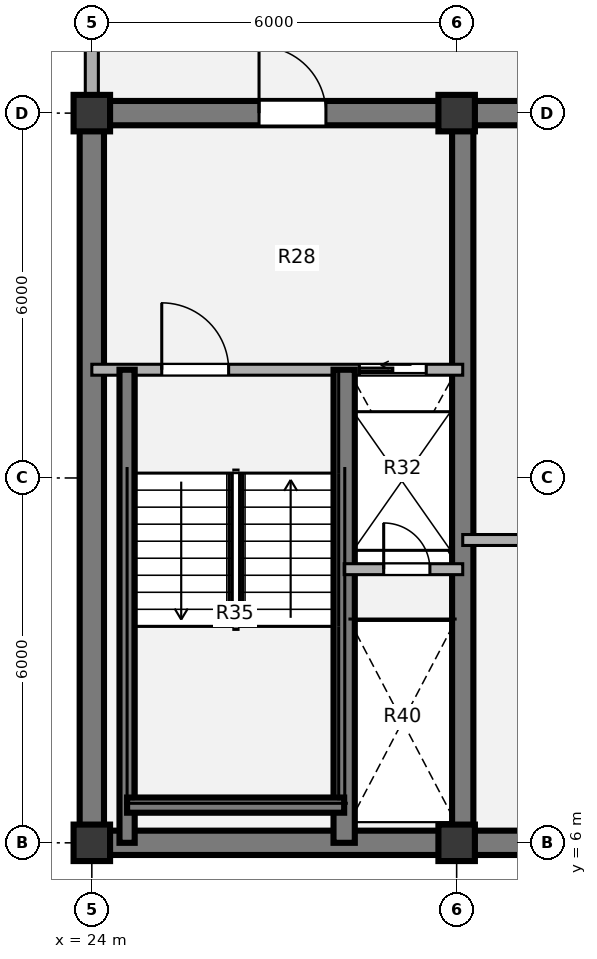
"""IFC4 building model, lengths in metres.
Left out: names, types, materials, properties, quantities, classifications, styles, units other than length and angle.
Written with IfcOpenShell. Run it as: python <this file> out.ifc"""

import sys

from ifc_helpers import new_model, si_unit, direction, frame, frame_2d, origin, origin_2d, place, context, subcontext, project, spatial, rectangle, extrude, source, transform, mapped, element, fill, save


model = new_model("IFC4")
c1 = context("Model", 3, precision=1e-05, world=origin(), true_north=direction((0.0, 1.0)))
c2 = subcontext(c1, "Body", "Model", "MODEL_VIEW")
j1 = project(units=[si_unit("LENGTHUNIT", "METRE"), si_unit("PLANEANGLEUNIT", "RADIAN")], contexts=[c1])
p1 = place(None, origin())
s1 = spatial("IfcSite", under=j1, at=p1, CompositionType="ELEMENT")
p2 = place(p1, origin())
s2 = spatial("IfcBuilding", under=s1, at=p2, CompositionType="ELEMENT")
p3 = place(p2, frame((0.0, 0.0, 226.8)))
s3 = spatial("IfcBuildingStorey", under=s2, at=p3, CompositionType="ELEMENT", Elevation=226.8)
m1 = source(origin(), c2, "Body", "SweptSolid", [
    extrude(rectangle(XDim=0.6, YDim=0.6, at=origin_2d()), origin(), (0.0, 0.0, 1.0), 3.78),
])
for number, where, z_axis, x_axis in (
    (1, (24.0, 6.0, 0.0), (0.0, 0.0, 1.0), (1.0, 0.0, 0.0)),
    (2, (30.0, 6.0, 0.0), (0.0, 0.0, 1.0), (1.0, 0.0, 0.0)),
    (3, (24.0, 18.0, 0.0), (0.0, 0.0, 1.0), (1.0, 0.0, 0.0)),
    (4, (30.0, 18.0, 0.0), (0.0, 0.0, 1.0), (1.0, 0.0, 0.0)),
):
    element("IfcColumn", number, at=place(p3, frame(where, z_axis=z_axis, x_axis=x_axis)), inside=s3, PredefinedType="COLUMN", context=c2, shape_type="MappedRepresentation", body=[
        mapped(m1, transform((0.0, 0.0, 0.0), x_axis=(1.0, 0.0, 0.0), y_axis=(0.0, 1.0, 0.0), z_axis=(0.0, 0.0, 1.0), scale=1.0)),
    ])
p4 = place(p3, frame((48.2, 6.0, 0.0), z_axis=(0.0, 0.0, 1.0), x_axis=(-1.0, 0.0, 0.0)))
e5 = element("IfcWall", 5, at=p4, inside=s3, PredefinedType="SHEAR", context=c2, shape_type="SweptSolid", body=[
    extrude(rectangle(XDim=24.4, YDim=0.4, at=frame_2d((12.2, 0.0))), origin(), (0.0, 0.0, 1.0), 3.78),
])
p5 = place(p3, frame((24.0, 6.0, 0.0), z_axis=(0.0, 0.0, 1.0), x_axis=(0.0, 1.0, 0.0)))
e6 = element("IfcWall", 6, at=p5, inside=s3, PredefinedType="SHEAR", context=c2, shape_type="SweptSolid", body=[
    extrude(rectangle(XDim=12.0, YDim=0.4, at=frame_2d((6.0, 0.0))), origin(), (0.0, 0.0, 1.0), 3.78),
])
p6 = place(p3, frame((23.8, 18.0, 0.0), z_axis=(0.0, 0.0, 1.0), x_axis=(1.0, 0.0, 0.0)))
e7 = element("IfcWall", 7, at=p6, inside=s3, PredefinedType="SHEAR", context=c2, shape_type="SweptSolid", body=[
    extrude(rectangle(XDim=9.4, YDim=0.4, at=frame_2d((4.7, 0.0))), origin(), (0.0, 0.0, 1.0), 3.78),
])
p7 = place(p6, frame((2.95, 0.0, 0.0)))
e8 = element("IfcOpeningElement", 8, at=p7, cuts=e7, PredefinedType="OPENING", context=c2, shape_type="SweptSolid", body=[
    extrude(rectangle(XDim=1.1, YDim=2.1, at=origin_2d()), frame((0.55, 0.21, 1.05), z_axis=(0.0, -1.0, 0.0), x_axis=(1.0, 0.0, 0.0)), (0.0, 0.0, 1.0), 0.42),
])
p8 = place(p3, frame((30.1, 6.0, 0.0), z_axis=(0.0, 0.0, 1.0), x_axis=(0.0, 1.0, 0.0)))
e9 = element("IfcWall", 9, at=p8, inside=s3, PredefinedType="SHEAR", context=c2, shape_type="SweptSolid", body=[
    extrude(rectangle(XDim=12.0, YDim=0.35, at=frame_2d((6.0, 0.0))), origin(), (0.0, 0.0, 1.0), 3.78),
])
p9 = place(p3, frame((24.0, 18.28, 0.0), z_axis=(0.0, 0.0, 1.0), x_axis=(0.0, 1.0, 0.0)))
e10 = element("IfcWall", 10, at=p9, inside=s3, PredefinedType="SOLIDWALL", context=c2, shape_type="SweptSolid", body=[
    extrude(rectangle(XDim=2.77, YDim=0.215, at=frame_2d((1.385, 0.0))), origin(), (0.0, 0.0, 1.0), 2.718),
])
p10 = place(p3, frame((30.1, 10.98, 0.0), z_axis=(0.0, 0.0, 1.0), x_axis=(1.0, 0.0, 0.0)))
e11 = element("IfcWall", 11, at=p10, inside=s3, PredefinedType="PARTITIONING", context=c2, shape_type="SweptSolid", body=[
    extrude(rectangle(XDim=4.08, YDim=0.18, at=frame_2d((2.04, 0.0))), origin(), (0.0, 0.0, 1.0), 3.5),
])
p11 = place(p3, frame((24.0, 13.78, 0.0), z_axis=(0.0, 0.0, 1.0), x_axis=(1.0, 0.0, 0.0)))
e12 = element("IfcWall", 12, at=p11, inside=s3, PredefinedType="PARTITIONING", context=c2, shape_type="SweptSolid", body=[
    extrude(rectangle(XDim=6.1, YDim=0.18, at=frame_2d((3.05, 0.0))), origin(), (0.0, 0.0, 1.0), 3.5),
])
p12 = place(p11, frame((1.15, 0.0, 0.0)))
e13 = element("IfcOpeningElement", 13, at=p12, cuts=e12, PredefinedType="OPENING", context=c2, shape_type="SweptSolid", body=[
    extrude(rectangle(XDim=1.1, YDim=2.1, at=origin_2d()), frame((0.55, 0.1, 1.05), z_axis=(0.0, -1.0, 0.0), x_axis=(1.0, 0.0, 0.0)), (0.0, 0.0, 1.0), 0.2),
])
p13 = place(p11, frame((4.4, 0.0, 0.0)))
e14 = element("IfcOpeningElement", 14, at=p13, cuts=e12, PredefinedType="OPENING", context=c2, shape_type="SweptSolid", body=[
    extrude(rectangle(XDim=1.1, YDim=2.1, at=origin_2d()), frame((0.55, 0.1, 1.05), z_axis=(0.0, -1.0, 0.0), x_axis=(1.0, 0.0, 0.0)), (0.0, 0.0, 1.0), 0.2),
])
p14 = place(p3, frame((28.15, 6.0, 0.0), z_axis=(0.0, 0.0, 1.0), x_axis=(0.0, 1.0, 0.0)))
e15 = element("IfcWall", 15, at=p14, inside=s3, PredefinedType="SHEAR", context=c2, shape_type="SweptSolid", body=[
    extrude(rectangle(XDim=7.78, YDim=0.35, at=frame_2d((3.89, 0.0))), origin(), (0.0, 0.0, 1.0), 3.85),
])
p15 = place(p3, frame((24.58, 6.0, 0.0), z_axis=(0.0, 0.0, 1.0), x_axis=(0.0, 1.0, 0.0)))
e16 = element("IfcWall", 16, at=p15, inside=s3, PredefinedType="SHEAR", context=c2, shape_type="SweptSolid", body=[
    extrude(rectangle(XDim=7.78, YDim=0.25, at=frame_2d((3.89, 0.0))), origin(), (0.0, 0.0, 1.0), 3.85),
])
p16 = place(p3, frame((24.58, 6.62, 0.0), z_axis=(0.0, 0.0, 1.0), x_axis=(1.0, 0.0, 0.0)))
e17 = element("IfcWall", 17, at=p16, inside=s3, PredefinedType="SHEAR", context=c2, shape_type="SweptSolid", body=[
    extrude(rectangle(XDim=3.57, YDim=0.25, at=frame_2d((1.785, 0.0))), origin(), (0.0, 0.0, 1.0), 3.85),
])
p17 = place(p3, frame((28.15, 10.5, 0.0), z_axis=(0.0, 0.0, 1.0), x_axis=(1.0, 0.0, 0.0)))
e18 = element("IfcWall", 18, at=p17, inside=s3, PredefinedType="PARTITIONING", context=c2, shape_type="SweptSolid", body=[
    extrude(rectangle(XDim=1.95, YDim=0.18, at=frame_2d((0.975, 0.0))), origin(), (0.0, 0.0, 1.0), 3.5),
])
p18 = place(p17, frame((0.65, 0.0, 0.0)))
e19 = element("IfcOpeningElement", 19, at=p18, cuts=e18, PredefinedType="OPENING", context=c2, shape_type="SweptSolid", body=[
    extrude(rectangle(XDim=0.76, YDim=2.05, at=origin_2d()), frame((0.38, 0.1, 1.025), z_axis=(0.0, -1.0, 0.0), x_axis=(1.0, 0.0, 0.0)), (0.0, 0.0, 1.0), 0.2),
])
m2 = source(origin(), c2, "Body", "SweptSolid", [
    extrude(rectangle(XDim=1.1, YDim=2.1, at=origin_2d()), frame((0.55, 0.025, 1.05), z_axis=(0.0, -1.0, 0.0), x_axis=(1.0, 0.0, 0.0)), (0.0, 0.0, 1.0), 0.05),
])
p19 = place(p12, origin())
e20 = element("IfcDoor", 20, at=p19, inside=s3, OperationType="SINGLE_SWING_LEFT", PredefinedType="DOOR", context=c2, shape_type="MappedRepresentation", body=[
    mapped(m2, transform((0.0, 0.0, 0.0), x_axis=(1.0, 0.0, 0.0), y_axis=(0.0, 1.0, 0.0), z_axis=(0.0, 0.0, 1.0), scale=1.0)),
])
fill(e13, e20)
m3 = source(origin(), c2, "Body", "SweptSolid", [
    extrude(rectangle(XDim=1.1, YDim=2.1, at=origin_2d()), frame((0.55, 0.025, 1.05), z_axis=(0.0, -1.0, 0.0), x_axis=(1.0, 0.0, 0.0)), (0.0, 0.0, 1.0), 0.05),
])
p20 = place(p13, origin())
e21 = element("IfcDoor", 21, at=p20, inside=s3, OperationType="SLIDING_TO_LEFT", PredefinedType="DOOR", context=c2, shape_type="MappedRepresentation", body=[
    mapped(m3, transform((0.0, 0.0, 0.0), x_axis=(1.0, 0.0, 0.0), y_axis=(0.0, 1.0, 0.0), z_axis=(0.0, 0.0, 1.0), scale=1.0)),
])
fill(e14, e21)
m4 = source(origin(), c2, "Body", "SweptSolid", [
    extrude(rectangle(XDim=0.76, YDim=2.05, at=origin_2d()), frame((0.38, 0.025, 1.025), z_axis=(0.0, -1.0, 0.0), x_axis=(1.0, 0.0, 0.0)), (0.0, 0.0, 1.0), 0.05),
])
p21 = place(p18, origin())
e22 = element("IfcDoor", 22, at=p21, inside=s3, OperationType="SINGLE_SWING_LEFT", PredefinedType="DOOR", context=c2, shape_type="MappedRepresentation", body=[
    mapped(m4, transform((0.0, 0.0, 0.0), x_axis=(1.0, 0.0, 0.0), y_axis=(0.0, 1.0, 0.0), z_axis=(0.0, 0.0, 1.0), scale=1.0)),
])
fill(e19, e22)
m5 = source(origin(), c2, "Body", "SweptSolid", [
    extrude(rectangle(XDim=1.1, YDim=2.1, at=origin_2d()), frame((0.55, 0.025, 1.05), z_axis=(0.0, -1.0, 0.0), x_axis=(1.0, 0.0, 0.0)), (0.0, 0.0, 1.0), 0.05),
])
p22 = place(p7, origin())
e23 = element("IfcDoor", 23, at=p22, inside=s3, OperationType="SINGLE_SWING_LEFT", PredefinedType="DOOR", context=c2, shape_type="MappedRepresentation", body=[
    mapped(m5, transform((0.0, 0.0, 0.0), x_axis=(1.0, 0.0, 0.0), y_axis=(0.0, 1.0, 0.0), z_axis=(0.0, 0.0, 1.0), scale=1.0)),
])
fill(e8, e23)
save(model, sys.argv[1])
